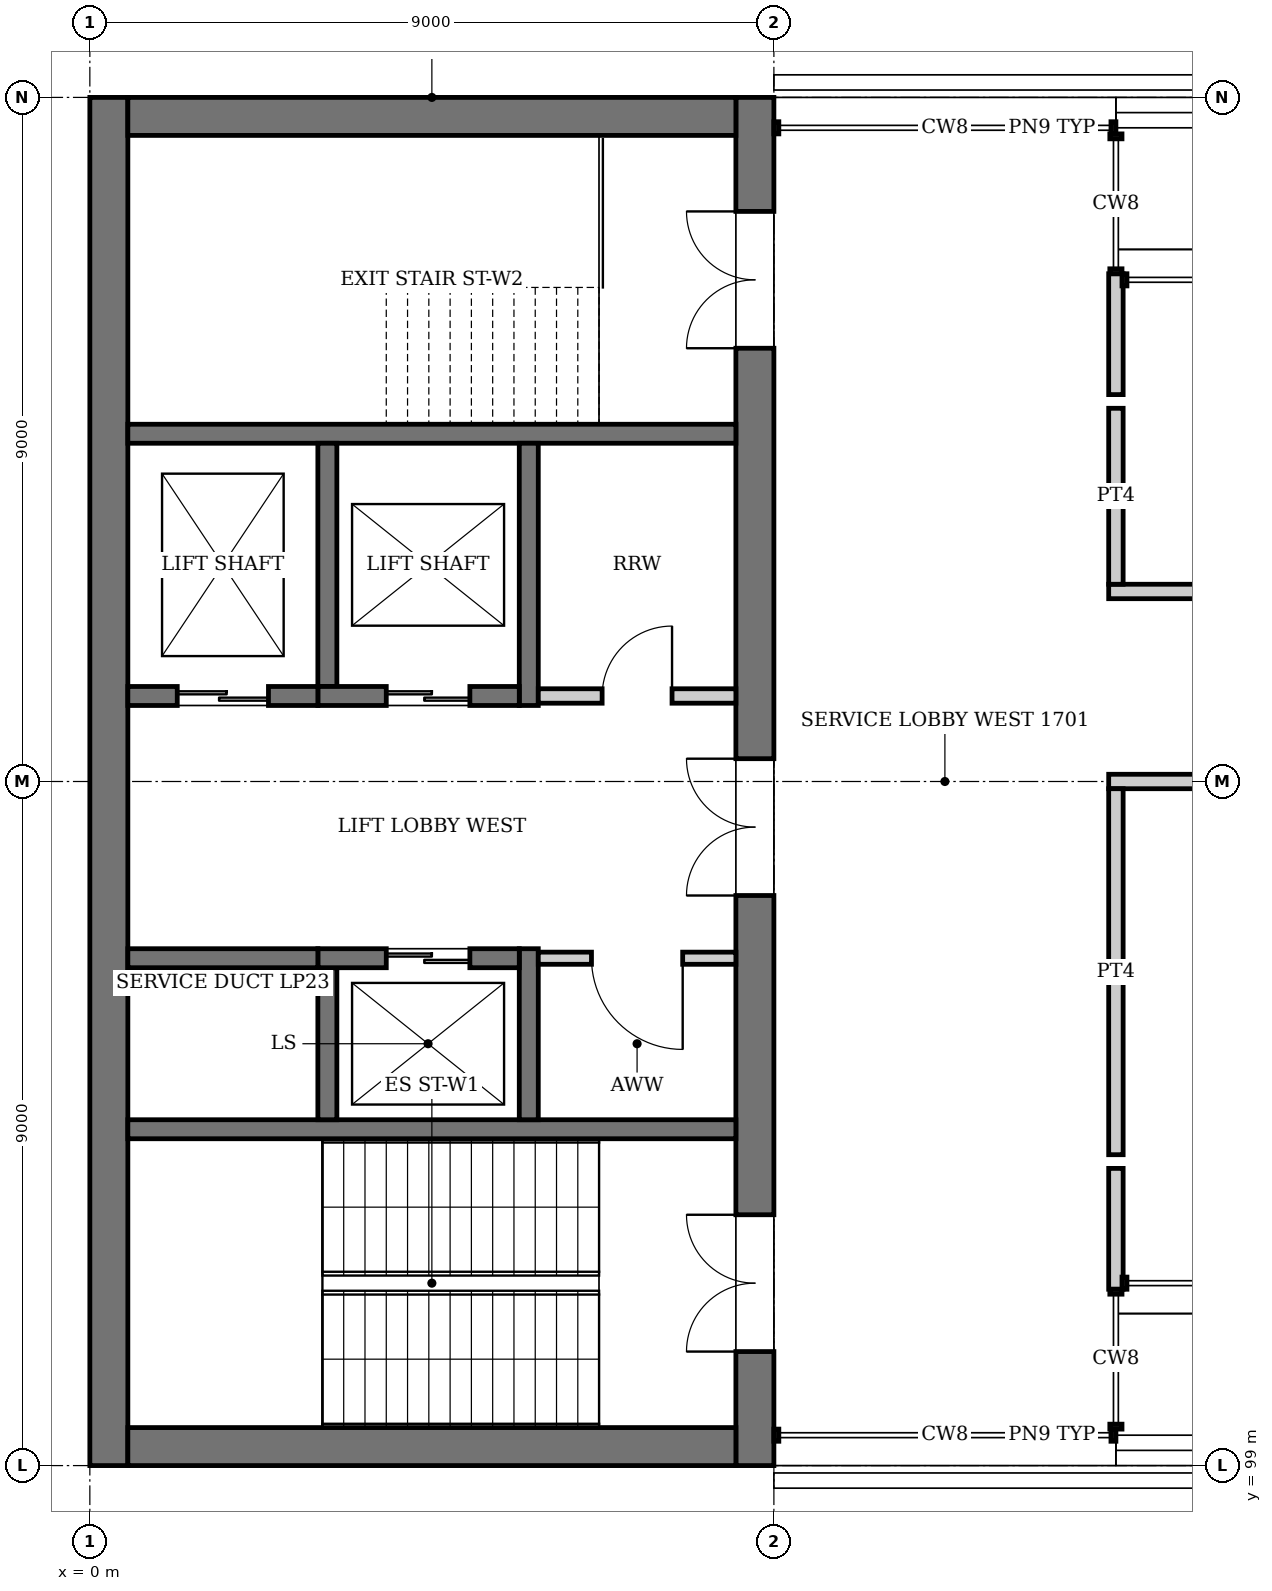
"""IFC4 building model, lengths in metres.
Left out: names, types, materials, properties, quantities, classifications, styles, units other than length and angle.
Written with IfcOpenShell. Run it as: python <this file> out.ifc"""

import sys

from ifc_helpers import new_model, si_unit, direction, frame, frame_2d, origin, place, context, subcontext, project, spatial, rectangle, extrude, element, fill, save


model = new_model("IFC4")
c1 = context("Model", 3, precision=1e-05, world=origin(), true_north=direction((0.0, 1.0)))
c2 = subcontext(c1, "Body", "Model", "MODEL_VIEW")
j1 = project(units=[si_unit("LENGTHUNIT", "METRE"), si_unit("PLANEANGLEUNIT", "RADIAN")], contexts=[c1])
p1 = place(None, origin())
s1 = spatial("IfcSite", under=j1, at=p1, CompositionType="ELEMENT")
p2 = place(p1, origin())
s2 = spatial("IfcBuilding", under=s1, at=p2, CompositionType="ELEMENT")
p3 = place(p2, frame((0.0, 0.0, 71.2)))
s3 = spatial("IfcBuildingStorey", under=s2, at=p3, CompositionType="ELEMENT", Elevation=71.2)
p4 = place(p3, frame((0.25, 99.0, 0.0), z_axis=(0.0, 0.0, 1.0), x_axis=(0.0, 1.0, 0.0)))
e1 = element("IfcWall", 1, at=p4, inside=s3, PredefinedType="SHEAR", context=c2, shape_type="SweptSolid", body=[
    extrude(rectangle(XDim=18.0, YDim=0.5, at=frame_2d((9.0, 0.0))), origin(), (0.0, 0.0, 1.0), 4.65),
])
p5 = place(p3, frame((8.75, 99.0, 0.0), z_axis=(0.0, 0.0, 1.0), x_axis=(0.0, 1.0, 0.0)))
e2 = element("IfcWall", 2, at=p5, inside=s3, PredefinedType="SHEAR", context=c2, shape_type="SweptSolid", body=[
    extrude(rectangle(XDim=18.0, YDim=0.5, at=frame_2d((9.0, 0.0))), origin(), (0.0, 0.0, 1.0), 4.65),
])
p6 = place(p5, frame((1.5, 0.0, 0.0)))
e3 = element("IfcOpeningElement", 3, at=p6, cuts=e2, PredefinedType="OPENING", context=c2, shape_type="SweptSolid", body=[
    extrude(rectangle(XDim=1.8, YDim=2.1, at=frame_2d((0.9, 1.05))), frame((0.0, 0.26, 0.0), z_axis=(0.0, -1.0, 0.0), x_axis=(1.0, 0.0, 0.0)), (0.0, 0.0, 1.0), 0.52),
])
p7 = place(p5, frame((14.7, 0.0, 0.0)))
e4 = element("IfcOpeningElement", 4, at=p7, cuts=e2, PredefinedType="OPENING", context=c2, shape_type="SweptSolid", body=[
    extrude(rectangle(XDim=1.8, YDim=2.1, at=frame_2d((0.9, 1.05))), frame((0.0, 0.26, 0.0), z_axis=(0.0, -1.0, 0.0), x_axis=(1.0, 0.0, 0.0)), (0.0, 0.0, 1.0), 0.52),
])
p8 = place(p5, frame((7.5, 0.0, 0.0)))
e5 = element("IfcOpeningElement", 5, at=p8, cuts=e2, PredefinedType="OPENING", context=c2, shape_type="SweptSolid", body=[
    extrude(rectangle(XDim=1.8, YDim=2.1, at=frame_2d((0.9, 1.05))), frame((0.0, 0.26, 0.0), z_axis=(0.0, -1.0, 0.0), x_axis=(1.0, 0.0, 0.0)), (0.0, 0.0, 1.0), 0.52),
])
for number, where, z_axis, x_axis in (
    (6, (0.5, 99.25, 0.0), (0.0, 0.0, 1.0), (1.0, 0.0, 0.0)),
    (7, (0.5, 116.75, 0.0), (0.0, 0.0, 1.0), (1.0, 0.0, 0.0)),
):
    element("IfcWall", number, at=place(p3, frame(where, z_axis=z_axis, x_axis=x_axis)), inside=s3, PredefinedType="SHEAR", context=c2, shape_type="SweptSolid", body=[
        extrude(rectangle(XDim=8.0, YDim=0.5, at=frame_2d((4.0, 0.0))), origin(), (0.0, 0.0, 1.0), 4.65),
    ])
for number, where, z_axis, x_axis in (
    (8, (13.5, 99.3, 0.0), (0.0, 0.0, 1.0), (1.0, 0.0, 0.0)),
    (9, (13.5, 116.7, 0.0), (0.0, 0.0, 1.0), (1.0, 0.0, 0.0)),
):
    element("IfcWall", number, at=place(p3, frame(where, z_axis=z_axis, x_axis=x_axis)), inside=s3, PredefinedType="PARAPET", context=c2, shape_type="SweptSolid", body=[
        extrude(rectangle(XDim=27.0, YDim=0.2, at=frame_2d((13.5, 0.0))), origin(), (0.0, 0.0, 1.0), 1.1),
    ])
for number, where, z_axis, x_axis in (
    (10, (9.0, 98.803, 4.65), (0.0, 0.0, 1.0), (1.0, 0.0, 0.0)),
    (11, (9.0, 117.197, 4.65), (0.0, 0.0, 1.0), (1.0, 0.0, 0.0)),
):
    element("IfcWall", number, at=place(p3, frame(where, z_axis=z_axis, x_axis=x_axis)), inside=s3, PredefinedType="PARAPET", context=c2, shape_type="SweptSolid", body=[
        extrude(rectangle(XDim=36.0, YDim=0.2, at=frame_2d((18.0, 0.0))), origin(), (0.0, 0.0, 1.0), 1.29),
    ])
p9 = place(p3, frame((12.0, 101.0, 4.8), z_axis=(0.0, 0.0, 1.0), x_axis=(1.0, 0.0, 0.0)))
e12 = element("IfcWall", 12, at=p9, inside=s3, PredefinedType="SOLIDWALL", context=c2, shape_type="SweptSolid", body=[
    extrude(rectangle(XDim=30.0, YDim=0.18, at=frame_2d((15.0, 0.0))), origin(), (0.0, 0.0, 1.0), 1.6),
])
p10 = place(p3, frame((9.0, 103.0, 4.8), z_axis=(0.0, 0.0, 1.0), x_axis=(1.0, 0.0, 0.0)))
e13 = element("IfcWall", 13, at=p10, inside=s3, PredefinedType="SOLIDWALL", context=c2, shape_type="SweptSolid", body=[
    extrude(rectangle(XDim=36.0, YDim=0.18, at=frame_2d((18.0, 0.0))), origin(), (0.0, 0.0, 1.0), 3.0),
])
p11 = place(p3, frame((12.0, 115.0, 4.8), z_axis=(0.0, 0.0, 1.0), x_axis=(1.0, 0.0, 0.0)))
e14 = element("IfcWall", 14, at=p11, inside=s3, PredefinedType="SOLIDWALL", context=c2, shape_type="SweptSolid", body=[
    extrude(rectangle(XDim=30.0, YDim=0.18, at=frame_2d((15.0, 0.0))), origin(), (0.0, 0.0, 1.0), 1.6),
])
p12 = place(p3, frame((9.0, 113.0, 4.8), z_axis=(0.0, 0.0, 1.0), x_axis=(1.0, 0.0, 0.0)))
e15 = element("IfcWall", 15, at=p12, inside=s3, PredefinedType="SOLIDWALL", context=c2, shape_type="SweptSolid", body=[
    extrude(rectangle(XDim=36.0, YDim=0.18, at=frame_2d((18.0, 0.0))), origin(), (0.0, 0.0, 1.0), 3.0),
])
for number, where, z_axis, x_axis in (
    (16, (8.5, 103.425, 0.0), (0.0, 0.0, 1.0), (-1.0, 0.0, 0.0)),
    (17, (8.5, 112.575, 0.0), (0.0, 0.0, 1.0), (-1.0, 0.0, 0.0)),
):
    element("IfcWall", number, at=place(p3, frame(where, z_axis=z_axis, x_axis=x_axis)), inside=s3, PredefinedType="SOLIDWALL", context=c2, shape_type="SweptSolid", body=[
        extrude(rectangle(XDim=8.0, YDim=0.25, at=frame_2d((4.0, 0.0))), origin(), (0.0, 0.0, 1.0), 4.55),
    ])
p13 = place(p3, frame((5.775, 103.55, 0.0), z_axis=(0.0, 0.0, 1.0), x_axis=(0.0, 1.0, 0.0)))
e18 = element("IfcWall", 18, at=p13, inside=s3, PredefinedType="SOLIDWALL", context=c2, shape_type="SweptSolid", body=[
    extrude(rectangle(XDim=2.25, YDim=0.25, at=frame_2d((1.125, 0.0))), origin(), (0.0, 0.0, 1.0), 4.55),
])
p14 = place(p3, frame((3.125, 103.55, 0.0), z_axis=(0.0, 0.0, 1.0), x_axis=(0.0, 1.0, 0.0)))
e19 = element("IfcWall", 19, at=p14, inside=s3, PredefinedType="SOLIDWALL", context=c2, shape_type="SweptSolid", body=[
    extrude(rectangle(XDim=2.0, YDim=0.25, at=frame_2d((1.0, 0.0))), origin(), (0.0, 0.0, 1.0), 4.55),
])
p15 = place(p3, frame((5.65, 105.675, 0.0), z_axis=(0.0, 0.0, 1.0), x_axis=(-1.0, 0.0, 0.0)))
e20 = element("IfcWall", 20, at=p15, inside=s3, PredefinedType="SOLIDWALL", context=c2, shape_type="SweptSolid", body=[
    extrude(rectangle(XDim=2.65, YDim=0.25, at=frame_2d((1.325, 0.0))), origin(), (0.0, 0.0, 1.0), 4.55),
])
p16 = place(p15, frame((0.65, 0.0, 0.0)))
e21 = element("IfcOpeningElement", 21, at=p16, cuts=e20, PredefinedType="OPENING", context=c2, shape_type="SweptSolid", body=[
    extrude(rectangle(XDim=1.1, YDim=2.1, at=frame_2d((0.55, 1.05))), frame((0.0, 0.135, 0.0), z_axis=(0.0, -1.0, 0.0), x_axis=(1.0, 0.0, 0.0)), (0.0, 0.0, 1.0), 0.27),
])
p17 = place(p3, frame((3.0, 105.675, 0.0), z_axis=(0.0, 0.0, 1.0), x_axis=(-1.0, 0.0, 0.0)))
e22 = element("IfcWall", 22, at=p17, inside=s3, PredefinedType="SOLIDWALL", context=c2, shape_type="SweptSolid", body=[
    extrude(rectangle(XDim=2.5, YDim=0.25, at=frame_2d((1.25, 0.0))), origin(), (0.0, 0.0, 1.0), 4.55),
])
p18 = place(p3, frame((5.775, 109.0, 0.0), z_axis=(0.0, 0.0, 1.0), x_axis=(0.0, 1.0, 0.0)))
e23 = element("IfcWall", 23, at=p18, inside=s3, PredefinedType="SOLIDWALL", context=c2, shape_type="SweptSolid", body=[
    extrude(rectangle(XDim=3.45, YDim=0.25, at=frame_2d((1.725, 0.0))), origin(), (0.0, 0.0, 1.0), 4.55),
])
p19 = place(p3, frame((3.125, 109.25, 0.0), z_axis=(0.0, 0.0, 1.0), x_axis=(0.0, 1.0, 0.0)))
e24 = element("IfcWall", 24, at=p19, inside=s3, PredefinedType="SOLIDWALL", context=c2, shape_type="SweptSolid", body=[
    extrude(rectangle(XDim=3.2, YDim=0.25, at=frame_2d((1.6, 0.0))), origin(), (0.0, 0.0, 1.0), 4.55),
])
p20 = place(p3, frame((5.65, 109.125, 0.0), z_axis=(0.0, 0.0, 1.0), x_axis=(-1.0, 0.0, 0.0)))
e25 = element("IfcWall", 25, at=p20, inside=s3, PredefinedType="SOLIDWALL", context=c2, shape_type="SweptSolid", body=[
    extrude(rectangle(XDim=2.65, YDim=0.25, at=frame_2d((1.325, 0.0))), origin(), (0.0, 0.0, 1.0), 4.55),
])
p21 = place(p20, frame((0.65, 0.0, 0.0)))
e26 = element("IfcOpeningElement", 26, at=p21, cuts=e25, PredefinedType="OPENING", context=c2, shape_type="SweptSolid", body=[
    extrude(rectangle(XDim=1.1, YDim=2.1, at=frame_2d((0.55, 1.05))), frame((0.0, 0.135, 0.0), z_axis=(0.0, -1.0, 0.0), x_axis=(1.0, 0.0, 0.0)), (0.0, 0.0, 1.0), 0.27),
])
p22 = place(p3, frame((3.0, 109.125, 0.0), z_axis=(0.0, 0.0, 1.0), x_axis=(-1.0, 0.0, 0.0)))
e27 = element("IfcWall", 27, at=p22, inside=s3, PredefinedType="SOLIDWALL", context=c2, shape_type="SweptSolid", body=[
    extrude(rectangle(XDim=2.5, YDim=0.25, at=frame_2d((1.25, 0.0))), origin(), (0.0, 0.0, 1.0), 4.55),
])
p23 = place(p22, frame((0.65, 0.0, 0.0)))
e28 = element("IfcOpeningElement", 28, at=p23, cuts=e27, PredefinedType="OPENING", context=c2, shape_type="SweptSolid", body=[
    extrude(rectangle(XDim=1.2, YDim=2.1, at=frame_2d((0.6, 1.05))), frame((0.0, 0.135, 0.0), z_axis=(0.0, -1.0, 0.0), x_axis=(1.0, 0.0, 0.0)), (0.0, 0.0, 1.0), 0.27),
])
p24 = place(p3, frame((8.5, 105.675, 0.0), z_axis=(0.0, 0.0, 1.0), x_axis=(-1.0, 0.0, 0.0)))
e29 = element("IfcWall", 29, at=p24, inside=s3, PredefinedType="PARTITIONING", context=c2, shape_type="SweptSolid", body=[
    extrude(rectangle(XDim=2.6, YDim=0.16, at=frame_2d((1.3, 0.0))), origin(), (0.0, 0.0, 1.0), 4.55),
])
p25 = place(p24, frame((0.7, 0.0, 0.0)))
e30 = element("IfcOpeningElement", 30, at=p25, cuts=e29, PredefinedType="OPENING", context=c2, shape_type="SweptSolid", body=[
    extrude(rectangle(XDim=1.2, YDim=2.1, at=frame_2d((0.6, 1.05))), frame((0.0, 0.09, 0.0), z_axis=(0.0, -1.0, 0.0), x_axis=(1.0, 0.0, 0.0)), (0.0, 0.0, 1.0), 0.18),
])
p26 = place(p3, frame((8.5, 109.125, 0.0), z_axis=(0.0, 0.0, 1.0), x_axis=(-1.0, 0.0, 0.0)))
e31 = element("IfcWall", 31, at=p26, inside=s3, PredefinedType="PARTITIONING", context=c2, shape_type="SweptSolid", body=[
    extrude(rectangle(XDim=2.6, YDim=0.19, at=frame_2d((1.3, 0.0))), origin(), (0.0, 0.0, 1.0), 4.55),
])
p27 = place(p26, frame((0.84, 0.0, 0.0)))
e32 = element("IfcOpeningElement", 32, at=p27, cuts=e31, PredefinedType="OPENING", context=c2, shape_type="SweptSolid", body=[
    extrude(rectangle(XDim=0.92, YDim=2.1, at=frame_2d((0.46, 1.05))), frame((0.0, 0.105, 0.0), z_axis=(0.0, -1.0, 0.0), x_axis=(1.0, 0.0, 0.0)), (0.0, 0.0, 1.0), 0.21),
])
p28 = place(p3, frame((13.405, 108.0, 0.0), z_axis=(0.0, 0.0, 1.0), x_axis=(1.0, 0.0, 0.0)))
e33 = element("IfcWall", 33, at=p28, inside=s3, PredefinedType="PARTITIONING", context=c2, shape_type="SweptSolid", body=[
    extrude(rectangle(XDim=18.27, YDim=0.19, at=frame_2d((9.135, 0.0))), origin(), (0.0, 0.0, 1.0), 3.858),
])
p29 = place(p28, frame((1.345, 0.0, 0.0)))
e34 = element("IfcOpeningElement", 34, at=p29, cuts=e33, PredefinedType="OPENING", context=c2, shape_type="SweptSolid", body=[
    extrude(rectangle(XDim=2.0, YDim=2.7, at=frame_2d((1.0, 1.35))), frame((0.0, 0.105, 0.0), z_axis=(0.0, -1.0, 0.0), x_axis=(1.0, 0.0, 0.0)), (0.0, 0.0, 1.0), 0.21),
])
p30 = place(p28, frame((10.345, 0.0, 0.0)))
e35 = element("IfcOpeningElement", 35, at=p30, cuts=e33, PredefinedType="OPENING", context=c2, shape_type="SweptSolid", body=[
    extrude(rectangle(XDim=2.0, YDim=2.7, at=frame_2d((1.0, 1.35))), frame((0.0, 0.105, 0.0), z_axis=(0.0, -1.0, 0.0), x_axis=(1.0, 0.0, 0.0)), (0.0, 0.0, 1.0), 0.21),
])
p31 = place(p3, frame((13.405, 110.5, 0.0), z_axis=(0.0, 0.0, 1.0), x_axis=(1.0, 0.0, 0.0)))
e36 = element("IfcWall", 36, at=p31, inside=s3, PredefinedType="PARTITIONING", context=c2, shape_type="SweptSolid", body=[
    extrude(rectangle(XDim=8.92, YDim=0.19, at=frame_2d((4.46, 0.0))), origin(), (0.0, 0.0, 1.0), 3.858),
])
p32 = place(p31, frame((3.595, 0.0, 0.0)))
e37 = element("IfcOpeningElement", 37, at=p32, cuts=e36, PredefinedType="OPENING", context=c2, shape_type="SweptSolid", body=[
    extrude(rectangle(XDim=2.0, YDim=2.7, at=frame_2d((1.0, 1.35))), frame((0.0, 0.105, 0.0), z_axis=(0.0, -1.0, 0.0), x_axis=(1.0, 0.0, 0.0)), (0.0, 0.0, 1.0), 0.21),
])
p33 = place(p3, frame((13.5, 101.32, 0.0), z_axis=(0.0, 0.0, 1.0), x_axis=(0.0, 1.0, 0.0)))
e38 = element("IfcWall", 38, at=p33, inside=s3, PredefinedType="PARTITIONING", context=c2, shape_type="SweptSolid", body=[
    extrude(rectangle(XDim=1.59, YDim=0.19, at=frame_2d((0.795, 0.0))), origin(), (0.0, 0.0, 1.0), 3.858),
])
p34 = place(p3, frame((13.5, 103.09, 0.0), z_axis=(0.0, 0.0, 1.0), x_axis=(0.0, 1.0, 0.0)))
e39 = element("IfcWall", 39, at=p34, inside=s3, PredefinedType="PARTITIONING", context=c2, shape_type="SweptSolid", body=[
    extrude(rectangle(XDim=4.815, YDim=0.19, at=frame_2d((2.407, 0.0))), origin(), (0.0, 0.0, 1.0), 3.858),
])
p35 = place(p3, frame((13.5, 110.595, 0.0), z_axis=(0.0, 0.0, 1.0), x_axis=(0.0, 1.0, 0.0)))
e40 = element("IfcWall", 40, at=p35, inside=s3, PredefinedType="PARTITIONING", context=c2, shape_type="SweptSolid", body=[
    extrude(rectangle(XDim=2.315, YDim=0.19, at=frame_2d((1.157, 0.0))), origin(), (0.0, 0.0, 1.0), 3.858),
])
p36 = place(p3, frame((13.5, 113.09, 0.0), z_axis=(0.0, 0.0, 1.0), x_axis=(0.0, 1.0, 0.0)))
e41 = element("IfcWall", 41, at=p36, inside=s3, PredefinedType="PARTITIONING", context=c2, shape_type="SweptSolid", body=[
    extrude(rectangle(XDim=1.59, YDim=0.19, at=frame_2d((0.795, 0.0))), origin(), (0.0, 0.0, 1.0), 3.858),
])
p37 = place(p16, origin())
e42 = element("IfcDoor", 42, at=p37, inside=s3, OperationType="DOUBLE_DOOR_SLIDING", PredefinedType="DOOR", context=c2, shape_type="SweptSolid", body=[
    extrude(rectangle(XDim=1.1, YDim=2.1, at=frame_2d((0.55, 1.05))), frame((0.0, 0.025, 0.0), z_axis=(0.0, -1.0, 0.0), x_axis=(1.0, 0.0, 0.0)), (0.0, 0.0, 1.0), 0.05),
])
fill(e21, e42)
p38 = place(p21, origin())
e43 = element("IfcDoor", 43, at=p38, inside=s3, OperationType="DOUBLE_DOOR_SLIDING", PredefinedType="DOOR", context=c2, shape_type="SweptSolid", body=[
    extrude(rectangle(XDim=1.1, YDim=2.1, at=frame_2d((0.55, 1.05))), frame((0.0, 0.025, 0.0), z_axis=(0.0, -1.0, 0.0), x_axis=(1.0, 0.0, 0.0)), (0.0, 0.0, 1.0), 0.05),
])
fill(e26, e43)
p39 = place(p23, origin())
e44 = element("IfcDoor", 44, at=p39, inside=s3, OperationType="DOUBLE_DOOR_SLIDING", PredefinedType="DOOR", context=c2, shape_type="SweptSolid", body=[
    extrude(rectangle(XDim=1.2, YDim=2.1, at=frame_2d((0.6, 1.05))), frame((0.0, 0.025, 0.0), z_axis=(0.0, -1.0, 0.0), x_axis=(1.0, 0.0, 0.0)), (0.0, 0.0, 1.0), 0.05),
])
fill(e28, e44)
p40 = place(p6, origin())
e45 = element("IfcDoor", 45, at=p40, inside=s3, OperationType="DOUBLE_DOOR_SINGLE_SWING", PredefinedType="DOOR", context=c2, shape_type="SweptSolid", body=[
    extrude(rectangle(XDim=1.8, YDim=2.1, at=frame_2d((0.9, 1.05))), frame((0.0, 0.025, 0.0), z_axis=(0.0, -1.0, 0.0), x_axis=(1.0, 0.0, 0.0)), (0.0, 0.0, 1.0), 0.05),
])
fill(e3, e45)
p41 = place(p7, origin())
e46 = element("IfcDoor", 46, at=p41, inside=s3, OperationType="DOUBLE_DOOR_SINGLE_SWING", PredefinedType="DOOR", context=c2, shape_type="SweptSolid", body=[
    extrude(rectangle(XDim=1.8, YDim=2.1, at=frame_2d((0.9, 1.05))), frame((0.0, 0.025, 0.0), z_axis=(0.0, -1.0, 0.0), x_axis=(1.0, 0.0, 0.0)), (0.0, 0.0, 1.0), 0.05),
])
fill(e4, e46)
p42 = place(p8, origin())
e47 = element("IfcDoor", 47, at=p42, inside=s3, OperationType="DOUBLE_DOOR_SINGLE_SWING", PredefinedType="DOOR", context=c2, shape_type="SweptSolid", body=[
    extrude(rectangle(XDim=1.8, YDim=2.1, at=frame_2d((0.9, 1.05))), frame((0.0, 0.025, 0.0), z_axis=(0.0, -1.0, 0.0), x_axis=(1.0, 0.0, 0.0)), (0.0, 0.0, 1.0), 0.05),
])
fill(e5, e47)
p43 = place(p25, origin())
e48 = element("IfcDoor", 48, at=p43, inside=s3, OperationType="SINGLE_SWING_LEFT", PredefinedType="DOOR", context=c2, shape_type="SweptSolid", body=[
    extrude(rectangle(XDim=1.2, YDim=2.1, at=frame_2d((0.6, 1.05))), frame((0.0, 0.025, 0.0), z_axis=(0.0, -1.0, 0.0), x_axis=(1.0, 0.0, 0.0)), (0.0, 0.0, 1.0), 0.05),
])
fill(e30, e48)
p44 = place(p27, frame((0.92, 0.0, 0.0), z_axis=(0.0, 0.0, 1.0), x_axis=(-1.0, 0.0, 0.0)))
e49 = element("IfcDoor", 49, at=p44, inside=s3, OperationType="SINGLE_SWING_RIGHT", PredefinedType="DOOR", context=c2, shape_type="SweptSolid", body=[
    extrude(rectangle(XDim=0.92, YDim=2.1, at=frame_2d((0.46, 1.05))), frame((0.0, 0.025, 0.0), z_axis=(0.0, -1.0, 0.0), x_axis=(1.0, 0.0, 0.0)), (0.0, 0.0, 1.0), 0.05),
])
fill(e32, e49)
save(model, sys.argv[1])
